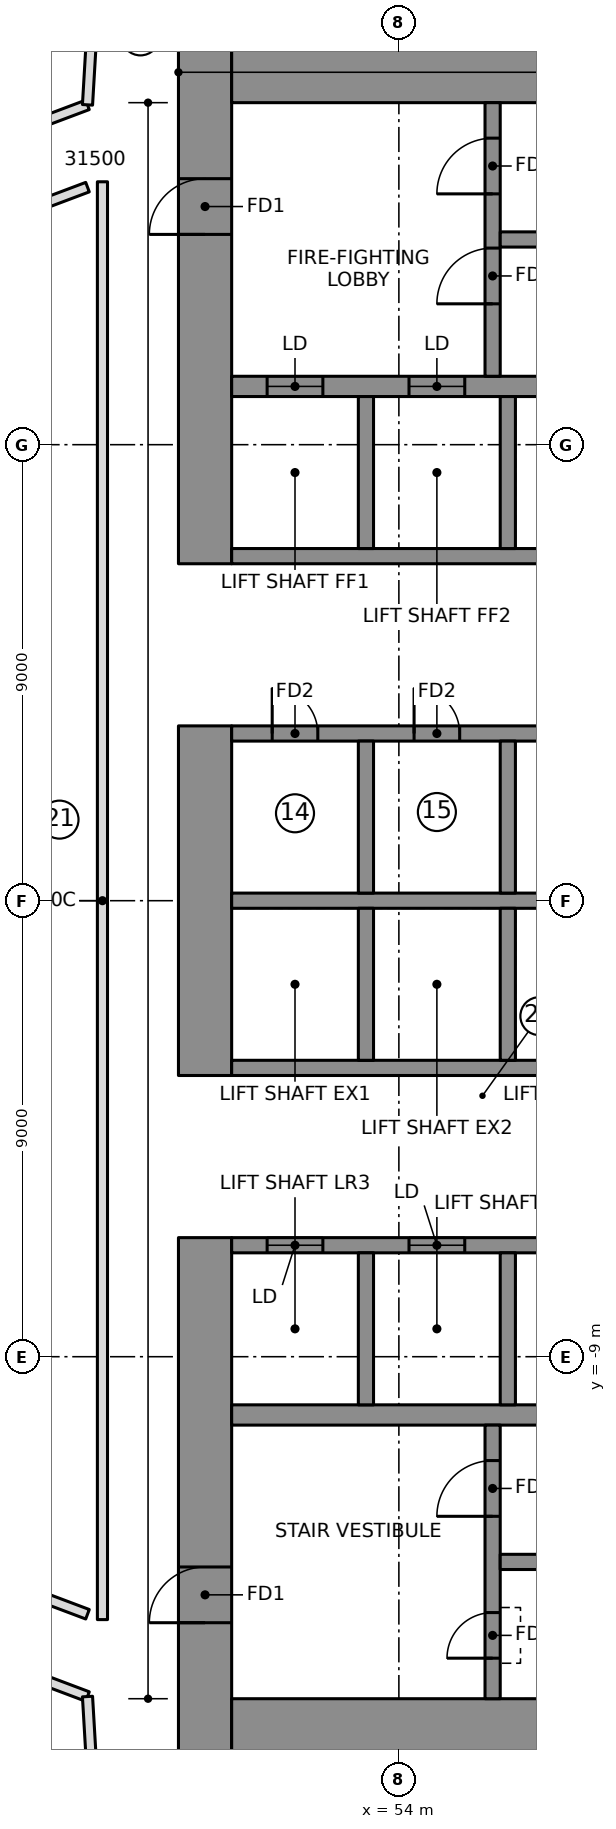
"""IFC4 building model, lengths in metres.
Left out: names, types, materials, properties, quantities, classifications, styles, units other than length and angle.
Written with IfcOpenShell. Run it as: python <this file> out.ifc"""

import sys

from ifc_helpers import new_model, si_unit, direction, frame, frame_2d, origin, place, context, subcontext, project, spatial, rectangle, extrude, element, fill, save


model = new_model("IFC4")
c1 = context("Model", 3, precision=1e-05, world=origin(), true_north=direction((0.0, 1.0)))
c2 = subcontext(c1, "Body", "Model", "MODEL_VIEW")
j1 = project(units=[si_unit("LENGTHUNIT", "METRE"), si_unit("PLANEANGLEUNIT", "RADIAN")], contexts=[c1])
p1 = place(None, origin())
s1 = spatial("IfcSite", under=j1, at=p1, CompositionType="ELEMENT")
p2 = place(p1, origin())
s2 = spatial("IfcBuilding", under=s1, at=p2, CompositionType="ELEMENT")
p3 = place(p2, frame((0.0, 0.0, 99.1)))
s3 = spatial("IfcBuildingStorey", under=s2, at=p3, CompositionType="ELEMENT", Elevation=99.1)
p4 = place(p3, frame((50.175, 6.65, 0.0), z_axis=(0.0, 0.0, 1.0), x_axis=(0.0, 1.0, 0.0)))
e1 = element("IfcWall", 1, at=p4, inside=s3, PredefinedType="SHEAR", context=c2, shape_type="SweptSolid", body=[
    extrude(rectangle(XDim=10.15, YDim=1.05, at=frame_2d((5.075, 0.0))), origin(), (0.0, 0.0, 1.0), 3.55),
])
p5 = place(p4, frame((6.5, 0.0, 0.0)))
e2 = element("IfcOpeningElement", 2, at=p5, cuts=e1, PredefinedType="OPENING", context=c2, shape_type="SweptSolid", body=[
    extrude(rectangle(XDim=1.1, YDim=2.1, at=frame_2d((0.55, 1.05))), frame((0.0, 0.535, 0.0), z_axis=(0.0, -1.0, 0.0), x_axis=(1.0, 0.0, 0.0)), (0.0, 0.0, 1.0), 1.07),
])
p6 = place(p3, frame((50.175, -3.45, 0.0), z_axis=(0.0, 0.0, 1.0), x_axis=(0.0, 1.0, 0.0)))
e3 = element("IfcWall", 3, at=p6, inside=s3, PredefinedType="SHEAR", context=c2, shape_type="SweptSolid", body=[
    extrude(rectangle(XDim=6.9, YDim=1.05, at=frame_2d((3.45, 0.0))), origin(), (0.0, 0.0, 1.0), 3.55),
])
p7 = place(p3, frame((50.175, -16.8, 0.0), z_axis=(0.0, 0.0, 1.0), x_axis=(0.0, 1.0, 0.0)))
e4 = element("IfcWall", 4, at=p7, inside=s3, PredefinedType="SHEAR", context=c2, shape_type="SweptSolid", body=[
    extrude(rectangle(XDim=10.15, YDim=1.05, at=frame_2d((5.075, 0.0))), origin(), (0.0, 0.0, 1.0), 3.55),
])
p8 = place(p7, frame((2.55, 0.0, 0.0)))
e5 = element("IfcOpeningElement", 5, at=p8, cuts=e4, PredefinedType="OPENING", context=c2, shape_type="SweptSolid", body=[
    extrude(rectangle(XDim=1.1, YDim=2.1, at=frame_2d((0.55, 1.05))), frame((0.0, 0.535, 0.0), z_axis=(0.0, -1.0, 0.0), x_axis=(1.0, 0.0, 0.0)), (0.0, 0.0, 1.0), 1.07),
])
for number, where, z_axis, x_axis in (
    (6, (50.7, 16.275, 0.0), (0.0, 0.0, 1.0), (1.0, 0.0, 0.0)),
    (7, (50.7, -16.275, 0.0), (0.0, 0.0, 1.0), (1.0, 0.0, 0.0)),
):
    element("IfcWall", number, at=place(p3, frame(where, z_axis=z_axis, x_axis=x_axis)), inside=s3, PredefinedType="SHEAR", context=c2, shape_type="SweptSolid", body=[
        extrude(rectangle(XDim=14.07, YDim=1.05, at=frame_2d((7.035, 0.0))), origin(), (0.0, 0.0, 1.0), 3.55),
    ])
p9 = place(p3, frame((50.7, 10.15, 0.0), z_axis=(0.0, 0.0, 1.0), x_axis=(1.0, 0.0, 0.0)))
e8 = element("IfcWall", 8, at=p9, inside=s3, PredefinedType="SHEAR", context=c2, shape_type="SweptSolid", body=[
    extrude(rectangle(XDim=13.02, YDim=0.4, at=frame_2d((6.51, 0.0))), origin(), (0.0, 0.0, 1.0), 3.55),
])
p10 = place(p9, frame((0.7, 0.0, 0.0)))
e9 = element("IfcOpeningElement", 9, at=p10, cuts=e8, PredefinedType="OPENING", context=c2, shape_type="SweptSolid", body=[
    extrude(rectangle(XDim=1.1, YDim=2.1, at=frame_2d((0.55, 1.05))), frame((0.0, 0.21, 0.0), z_axis=(0.0, -1.0, 0.0), x_axis=(1.0, 0.0, 0.0)), (0.0, 0.0, 1.0), 0.42),
])
p11 = place(p9, frame((3.5, 0.0, 0.0)))
e10 = element("IfcOpeningElement", 10, at=p11, cuts=e8, PredefinedType="OPENING", context=c2, shape_type="SweptSolid", body=[
    extrude(rectangle(XDim=1.1, YDim=2.1, at=frame_2d((0.55, 1.05))), frame((0.0, 0.21, 0.0), z_axis=(0.0, -1.0, 0.0), x_axis=(1.0, 0.0, 0.0)), (0.0, 0.0, 1.0), 0.42),
])
p12 = place(p3, frame((50.7, -10.15, 0.0), z_axis=(0.0, 0.0, 1.0), x_axis=(1.0, 0.0, 0.0)))
e11 = element("IfcWall", 11, at=p12, inside=s3, PredefinedType="SHEAR", context=c2, shape_type="SweptSolid", body=[
    extrude(rectangle(XDim=13.02, YDim=0.4, at=frame_2d((6.51, 0.0))), origin(), (0.0, 0.0, 1.0), 3.55),
])
p13 = place(p3, frame((50.7, 0.0, 0.0), z_axis=(0.0, 0.0, 1.0), x_axis=(1.0, 0.0, 0.0)))
e12 = element("IfcWall", 12, at=p13, inside=s3, PredefinedType="SHEAR", context=c2, shape_type="SweptSolid", body=[
    extrude(rectangle(XDim=10.9, YDim=0.3, at=frame_2d((5.45, 0.0))), origin(), (0.0, 0.0, 1.0), 3.55),
])
p14 = place(p3, frame((50.7, 3.3, 0.0), z_axis=(0.0, 0.0, 1.0), x_axis=(1.0, 0.0, 0.0)))
e13 = element("IfcWall", 13, at=p14, inside=s3, PredefinedType="SHEAR", context=c2, shape_type="SweptSolid", body=[
    extrude(rectangle(XDim=10.9, YDim=0.3, at=frame_2d((5.45, 0.0))), origin(), (0.0, 0.0, 1.0), 3.55),
])
p15 = place(p14, frame((0.8, 0.0, 0.0)))
e14 = element("IfcOpeningElement", 14, at=p15, cuts=e13, PredefinedType="OPENING", context=c2, shape_type="SweptSolid", body=[
    extrude(rectangle(XDim=0.9, YDim=2.1, at=frame_2d((0.45, 1.05))), frame((0.0, 0.16, 0.0), z_axis=(0.0, -1.0, 0.0), x_axis=(1.0, 0.0, 0.0)), (0.0, 0.0, 1.0), 0.32),
])
p16 = place(p14, frame((3.6, 0.0, 0.0)))
e15 = element("IfcOpeningElement", 15, at=p16, cuts=e13, PredefinedType="OPENING", context=c2, shape_type="SweptSolid", body=[
    extrude(rectangle(XDim=0.9, YDim=2.1, at=frame_2d((0.45, 1.05))), frame((0.0, 0.16, 0.0), z_axis=(0.0, -1.0, 0.0), x_axis=(1.0, 0.0, 0.0)), (0.0, 0.0, 1.0), 0.32),
])
p17 = place(p14, frame((6.4, 0.0, 0.0)))
e16 = element("IfcOpeningElement", 16, at=p17, cuts=e13, PredefinedType="OPENING", context=c2, shape_type="SweptSolid", body=[
    extrude(rectangle(XDim=0.9, YDim=2.1, at=frame_2d((0.45, 1.05))), frame((0.0, 0.16, 0.0), z_axis=(0.0, -1.0, 0.0), x_axis=(1.0, 0.0, 0.0)), (0.0, 0.0, 1.0), 0.32),
])
p18 = place(p14, frame((9.2, 0.0, 0.0)))
e17 = element("IfcOpeningElement", 17, at=p18, cuts=e13, PredefinedType="OPENING", context=c2, shape_type="SweptSolid", body=[
    extrude(rectangle(XDim=0.9, YDim=2.1, at=frame_2d((0.45, 1.05))), frame((0.0, 0.16, 0.0), z_axis=(0.0, -1.0, 0.0), x_axis=(1.0, 0.0, 0.0)), (0.0, 0.0, 1.0), 0.32),
])
p19 = place(p3, frame((50.7, 6.8, 0.0), z_axis=(0.0, 0.0, 1.0), x_axis=(1.0, 0.0, 0.0)))
e18 = element("IfcWall", 18, at=p19, inside=s3, PredefinedType="SHEAR", context=c2, shape_type="SweptSolid", body=[
    extrude(rectangle(XDim=10.9, YDim=0.3, at=frame_2d((5.45, 0.0))), origin(), (0.0, 0.0, 1.0), 3.55),
])
p20 = place(p19, frame((6.3, 0.0, 0.0)))
e19 = element("IfcOpeningElement", 19, at=p20, cuts=e18, PredefinedType="OPENING", context=c2, shape_type="SweptSolid", body=[
    extrude(rectangle(XDim=1.1, YDim=2.1, at=frame_2d((0.55, 1.05))), frame((0.0, 0.16, 0.0), z_axis=(0.0, -1.0, 0.0), x_axis=(1.0, 0.0, 0.0)), (0.0, 0.0, 1.0), 0.32),
])
p21 = place(p19, frame((9.1, 0.0, 0.0)))
e20 = element("IfcOpeningElement", 20, at=p21, cuts=e18, PredefinedType="OPENING", context=c2, shape_type="SweptSolid", body=[
    extrude(rectangle(XDim=1.1, YDim=2.1, at=frame_2d((0.55, 1.05))), frame((0.0, 0.16, 0.0), z_axis=(0.0, -1.0, 0.0), x_axis=(1.0, 0.0, 0.0)), (0.0, 0.0, 1.0), 0.32),
])
for number, where, z_axis, x_axis in (
    (21, (53.35, 0.15, 0.0), (0.0, 0.0, 1.0), (0.0, 1.0, 0.0)),
    (22, (53.35, 6.95, 0.0), (0.0, 0.0, 1.0), (0.0, 1.0, 0.0)),
    (23, (56.15, 0.15, 0.0), (0.0, 0.0, 1.0), (0.0, 1.0, 0.0)),
    (24, (56.15, 6.95, 0.0), (0.0, 0.0, 1.0), (0.0, 1.0, 0.0)),
):
    element("IfcWall", number, at=place(p3, frame(where, z_axis=z_axis, x_axis=x_axis)), inside=s3, PredefinedType="SHEAR", context=c2, shape_type="SweptSolid", body=[
        extrude(rectangle(XDim=3.0, YDim=0.3, at=frame_2d((1.5, 0.0))), origin(), (0.0, 0.0, 1.0), 3.55),
    ])
p22 = place(p3, frame((50.7, -3.3, 0.0), z_axis=(0.0, 0.0, 1.0), x_axis=(1.0, 0.0, 0.0)))
e25 = element("IfcWall", 25, at=p22, inside=s3, PredefinedType="SHEAR", context=c2, shape_type="SweptSolid", body=[
    extrude(rectangle(XDim=10.9, YDim=0.3, at=frame_2d((5.45, 0.0))), origin(), (0.0, 0.0, 1.0), 3.55),
])
p23 = place(p22, frame((9.2, 0.0, 0.0)))
e26 = element("IfcOpeningElement", 26, at=p23, cuts=e25, PredefinedType="OPENING", context=c2, shape_type="SweptSolid", body=[
    extrude(rectangle(XDim=0.9, YDim=2.1, at=frame_2d((0.45, 1.05))), frame((0.0, 0.16, 0.0), z_axis=(0.0, -1.0, 0.0), x_axis=(1.0, 0.0, 0.0)), (0.0, 0.0, 1.0), 0.32),
])
p24 = place(p3, frame((50.7, -6.8, 0.0), z_axis=(0.0, 0.0, 1.0), x_axis=(1.0, 0.0, 0.0)))
e27 = element("IfcWall", 27, at=p24, inside=s3, PredefinedType="SHEAR", context=c2, shape_type="SweptSolid", body=[
    extrude(rectangle(XDim=10.9, YDim=0.3, at=frame_2d((5.45, 0.0))), origin(), (0.0, 0.0, 1.0), 3.55),
])
p25 = place(p24, frame((0.7, 0.0, 0.0)))
e28 = element("IfcOpeningElement", 28, at=p25, cuts=e27, PredefinedType="OPENING", context=c2, shape_type="SweptSolid", body=[
    extrude(rectangle(XDim=1.1, YDim=2.1, at=frame_2d((0.55, 1.05))), frame((0.0, 0.16, 0.0), z_axis=(0.0, -1.0, 0.0), x_axis=(1.0, 0.0, 0.0)), (0.0, 0.0, 1.0), 0.32),
])
p26 = place(p24, frame((3.5, 0.0, 0.0)))
e29 = element("IfcOpeningElement", 29, at=p26, cuts=e27, PredefinedType="OPENING", context=c2, shape_type="SweptSolid", body=[
    extrude(rectangle(XDim=1.1, YDim=2.1, at=frame_2d((0.55, 1.05))), frame((0.0, 0.16, 0.0), z_axis=(0.0, -1.0, 0.0), x_axis=(1.0, 0.0, 0.0)), (0.0, 0.0, 1.0), 0.32),
])
p27 = place(p24, frame((6.3, 0.0, 0.0)))
e30 = element("IfcOpeningElement", 30, at=p27, cuts=e27, PredefinedType="OPENING", context=c2, shape_type="SweptSolid", body=[
    extrude(rectangle(XDim=1.1, YDim=2.1, at=frame_2d((0.55, 1.05))), frame((0.0, 0.16, 0.0), z_axis=(0.0, -1.0, 0.0), x_axis=(1.0, 0.0, 0.0)), (0.0, 0.0, 1.0), 0.32),
])
p28 = place(p24, frame((9.1, 0.0, 0.0)))
e31 = element("IfcOpeningElement", 31, at=p28, cuts=e27, PredefinedType="OPENING", context=c2, shape_type="SweptSolid", body=[
    extrude(rectangle(XDim=1.1, YDim=2.1, at=frame_2d((0.55, 1.05))), frame((0.0, 0.16, 0.0), z_axis=(0.0, -1.0, 0.0), x_axis=(1.0, 0.0, 0.0)), (0.0, 0.0, 1.0), 0.32),
])
for number, where, z_axis, x_axis in (
    (32, (53.35, -3.15, 0.0), (0.0, 0.0, 1.0), (0.0, 1.0, 0.0)),
    (33, (53.35, -9.95, 0.0), (0.0, 0.0, 1.0), (0.0, 1.0, 0.0)),
    (34, (56.15, -3.15, 0.0), (0.0, 0.0, 1.0), (0.0, 1.0, 0.0)),
    (35, (56.15, -9.95, 0.0), (0.0, 0.0, 1.0), (0.0, 1.0, 0.0)),
):
    element("IfcWall", number, at=place(p3, frame(where, z_axis=z_axis, x_axis=x_axis)), inside=s3, PredefinedType="SHEAR", context=c2, shape_type="SweptSolid", body=[
        extrude(rectangle(XDim=3.0, YDim=0.3, at=frame_2d((1.5, 0.0))), origin(), (0.0, 0.0, 1.0), 3.55),
    ])
p29 = place(p3, frame((55.85, 10.35, 0.0), z_axis=(0.0, 0.0, 1.0), x_axis=(0.0, 1.0, 0.0)))
e36 = element("IfcWall", 36, at=p29, inside=s3, PredefinedType="SHEAR", context=c2, shape_type="SweptSolid", body=[
    extrude(rectangle(XDim=5.4, YDim=0.3, at=frame_2d((2.7, 0.0))), origin(), (0.0, 0.0, 1.0), 3.55),
])
p30 = place(p29, frame((1.43, 0.0, 0.0)))
e37 = element("IfcOpeningElement", 37, at=p30, cuts=e36, PredefinedType="OPENING", context=c2, shape_type="SweptSolid", body=[
    extrude(rectangle(XDim=1.1, YDim=2.1, at=frame_2d((0.55, 1.05))), frame((0.0, 0.16, 0.0), z_axis=(0.0, -1.0, 0.0), x_axis=(1.0, 0.0, 0.0)), (0.0, 0.0, 1.0), 0.32),
])
p31 = place(p29, frame((3.6, 0.0, 0.0)))
e38 = element("IfcOpeningElement", 38, at=p31, cuts=e36, PredefinedType="OPENING", context=c2, shape_type="SweptSolid", body=[
    extrude(rectangle(XDim=1.1, YDim=2.1, at=frame_2d((0.55, 1.05))), frame((0.0, 0.16, 0.0), z_axis=(0.0, -1.0, 0.0), x_axis=(1.0, 0.0, 0.0)), (0.0, 0.0, 1.0), 0.32),
])
p32 = place(p3, frame((55.85, -15.75, 0.0), z_axis=(0.0, 0.0, 1.0), x_axis=(0.0, 1.0, 0.0)))
e39 = element("IfcWall", 39, at=p32, inside=s3, PredefinedType="SHEAR", context=c2, shape_type="SweptSolid", body=[
    extrude(rectangle(XDim=5.4, YDim=0.3, at=frame_2d((2.7, 0.0))), origin(), (0.0, 0.0, 1.0), 3.55),
])
p33 = place(p32, frame((3.6, 0.0, 0.0)))
e40 = element("IfcOpeningElement", 40, at=p33, cuts=e39, PredefinedType="OPENING", context=c2, shape_type="SweptSolid", body=[
    extrude(rectangle(XDim=1.1, YDim=2.1, at=frame_2d((0.55, 1.05))), frame((0.0, 0.16, 0.0), z_axis=(0.0, -1.0, 0.0), x_axis=(1.0, 0.0, 0.0)), (0.0, 0.0, 1.0), 0.32),
])
p34 = place(p32, frame((0.8, 0.0, 0.0)))
e41 = element("IfcOpeningElement", 41, at=p34, cuts=e39, PredefinedType="OPENING", context=c2, shape_type="SweptSolid", body=[
    extrude(rectangle(XDim=0.9, YDim=2.1, at=frame_2d((0.45, 1.05))), frame((0.0, 0.16, 0.0), z_axis=(0.0, -1.0, 0.0), x_axis=(1.0, 0.0, 0.0)), (0.0, 0.0, 1.0), 0.32),
])
for number, where, z_axis, x_axis in (
    (42, (56.0, 13.05, 0.0), (0.0, 0.0, 1.0), (1.0, 0.0, 0.0)),
    (43, (56.0, -13.05, 0.0), (0.0, 0.0, 1.0), (1.0, 0.0, 0.0)),
):
    element("IfcWall", number, at=place(p3, frame(where, z_axis=z_axis, x_axis=x_axis)), inside=s3, PredefinedType="SHEAR", context=c2, shape_type="SweptSolid", body=[
        extrude(rectangle(XDim=7.72, YDim=0.3, at=frame_2d((3.86, 0.0))), origin(), (0.0, 0.0, 1.0), 3.55),
    ])
for number, where, z_axis, x_axis in (
    (44, (47.855, 15.707, 0.0), (0.0, 0.0, 1.0), (-0.936, -0.353, 0.0)),
    (45, (46.924, -15.357, 0.0), (0.0, 0.0, 1.0), (0.936, -0.353, 0.0)),
):
    element("IfcWall", number, at=place(p3, frame(where, z_axis=z_axis, x_axis=x_axis)), inside=s3, PredefinedType="PARTITIONING", context=c2, shape_type="SweptSolid", body=[
        extrude(rectangle(XDim=0.995, YDim=0.2, at=frame_2d((0.497, 0.0))), origin(), (0.0, 0.0, 1.0), 3.25),
    ])
for number, where, z_axis, x_axis in (
    (46, (46.696, 13.647, 0.0), (0.0, 0.0, 1.0), (0.936, 0.352, 0.0)),
    (47, (47.855, -14.083, 0.0), (0.0, 0.0, 1.0), (-0.936, 0.352, 0.0)),
):
    element("IfcWall", number, at=place(p3, frame(where, z_axis=z_axis, x_axis=x_axis)), inside=s3, PredefinedType="PARTITIONING", context=c2, shape_type="SweptSolid", body=[
        extrude(rectangle(XDim=1.239, YDim=0.2, at=frame_2d((0.619, 0.0))), origin(), (0.0, 0.0, 1.0), 3.25),
    ])
p35 = place(p3, frame((48.146, 20.652, 0.0), z_axis=(0.0, 0.0, 1.0), x_axis=(-0.058649792989, -0.998278619315, 0.0)))
e48 = element("IfcWall", 48, at=p35, inside=s3, PredefinedType="PARTITIONING", context=c2, shape_type="SweptSolid", body=[
    extrude(rectangle(XDim=4.954, YDim=0.2, at=frame_2d((2.477, 0.0))), origin(), (0.0, 0.0, 1.0), 3.25),
])
p36 = place(p35, frame((1.977, 0.0, 0.0)))
e49 = element("IfcOpeningElement", 49, at=p36, cuts=e48, PredefinedType="OPENING", context=c2, shape_type="SweptSolid", body=[
    extrude(rectangle(XDim=1.0, YDim=2.1, at=frame_2d((0.5, 1.05))), frame((0.0, 0.11, 0.0), z_axis=(0.0, -1.0, 0.0), x_axis=(1.0, 0.0, 0.0)), (0.0, 0.0, 1.0), 0.22),
])
p37 = place(p3, frame((47.855, -15.707, 0.0), z_axis=(0.0, 0.0, 1.0), x_axis=(0.058568850083, -0.998283371493, 0.0)))
e50 = element("IfcWall", 50, at=p37, inside=s3, PredefinedType="PARTITIONING", context=c2, shape_type="SweptSolid", body=[
    extrude(rectangle(XDim=4.952, YDim=0.2, at=frame_2d((2.476, 0.0))), origin(), (0.0, 0.0, 1.0), 3.25),
])
p38 = place(p37, frame((1.976, 0.0, 0.0)))
e51 = element("IfcOpeningElement", 51, at=p38, cuts=e50, PredefinedType="OPENING", context=c2, shape_type="SweptSolid", body=[
    extrude(rectangle(XDim=1.0, YDim=2.1, at=frame_2d((0.5, 1.05))), frame((0.0, 0.11, 0.0), z_axis=(0.0, -1.0, 0.0), x_axis=(1.0, 0.0, 0.0)), (0.0, 0.0, 1.0), 0.22),
])
p39 = place(p3, frame((48.15, 14.189, 0.0), z_axis=(0.0, 0.0, 1.0), x_axis=(0.0, -1.0, 0.0)))
e52 = element("IfcWall", 52, at=p39, inside=s3, PredefinedType="PARTITIONING", context=c2, shape_type="SweptSolid", body=[
    extrude(rectangle(XDim=28.377, YDim=0.2, at=frame_2d((14.189, 0.0))), origin(), (0.0, 0.0, 1.0), 3.25),
])
p40 = place(p10, origin())
e53 = element("IfcDoor", 53, at=p40, inside=s3, OperationType="DOUBLE_DOOR_SLIDING", PredefinedType="DOOR", context=c2, shape_type="SweptSolid", body=[
    extrude(rectangle(XDim=1.1, YDim=2.1, at=frame_2d((0.55, 1.05))), frame((0.0, 0.025, 0.0), z_axis=(0.0, -1.0, 0.0), x_axis=(1.0, 0.0, 0.0)), (0.0, 0.0, 1.0), 0.05),
])
fill(e9, e53)
p41 = place(p11, origin())
e54 = element("IfcDoor", 54, at=p41, inside=s3, OperationType="DOUBLE_DOOR_SLIDING", PredefinedType="DOOR", context=c2, shape_type="SweptSolid", body=[
    extrude(rectangle(XDim=1.1, YDim=2.1, at=frame_2d((0.55, 1.05))), frame((0.0, 0.025, 0.0), z_axis=(0.0, -1.0, 0.0), x_axis=(1.0, 0.0, 0.0)), (0.0, 0.0, 1.0), 0.05),
])
fill(e10, e54)
p42 = place(p25, origin())
e55 = element("IfcDoor", 55, at=p42, inside=s3, OperationType="DOUBLE_DOOR_SLIDING", PredefinedType="DOOR", context=c2, shape_type="SweptSolid", body=[
    extrude(rectangle(XDim=1.1, YDim=2.1, at=frame_2d((0.55, 1.05))), frame((0.0, 0.025, 0.0), z_axis=(0.0, -1.0, 0.0), x_axis=(1.0, 0.0, 0.0)), (0.0, 0.0, 1.0), 0.05),
])
fill(e28, e55)
p43 = place(p26, origin())
e56 = element("IfcDoor", 56, at=p43, inside=s3, OperationType="DOUBLE_DOOR_SLIDING", PredefinedType="DOOR", context=c2, shape_type="SweptSolid", body=[
    extrude(rectangle(XDim=1.1, YDim=2.1, at=frame_2d((0.55, 1.05))), frame((0.0, 0.025, 0.0), z_axis=(0.0, -1.0, 0.0), x_axis=(1.0, 0.0, 0.0)), (0.0, 0.0, 1.0), 0.05),
])
fill(e29, e56)
p44 = place(p30, origin())
e57 = element("IfcDoor", 57, at=p44, inside=s3, OperationType="SINGLE_SWING_RIGHT", PredefinedType="DOOR", context=c2, shape_type="SweptSolid", body=[
    extrude(rectangle(XDim=1.1, YDim=2.1, at=frame_2d((0.55, 1.05))), frame((0.0, 0.025, 0.0), z_axis=(0.0, -1.0, 0.0), x_axis=(1.0, 0.0, 0.0)), (0.0, 0.0, 1.0), 0.05),
])
fill(e37, e57)
p45 = place(p31, origin())
e58 = element("IfcDoor", 58, at=p45, inside=s3, OperationType="SINGLE_SWING_RIGHT", PredefinedType="DOOR", context=c2, shape_type="SweptSolid", body=[
    extrude(rectangle(XDim=1.1, YDim=2.1, at=frame_2d((0.55, 1.05))), frame((0.0, 0.025, 0.0), z_axis=(0.0, -1.0, 0.0), x_axis=(1.0, 0.0, 0.0)), (0.0, 0.0, 1.0), 0.05),
])
fill(e38, e58)
p46 = place(p33, origin())
e59 = element("IfcDoor", 59, at=p46, inside=s3, OperationType="SINGLE_SWING_RIGHT", PredefinedType="DOOR", context=c2, shape_type="SweptSolid", body=[
    extrude(rectangle(XDim=1.1, YDim=2.1, at=frame_2d((0.55, 1.05))), frame((0.0, 0.025, 0.0), z_axis=(0.0, -1.0, 0.0), x_axis=(1.0, 0.0, 0.0)), (0.0, 0.0, 1.0), 0.05),
])
fill(e40, e59)
p47 = place(p5, origin())
e60 = element("IfcDoor", 60, at=p47, inside=s3, OperationType="SINGLE_SWING_RIGHT", PredefinedType="DOOR", context=c2, shape_type="SweptSolid", body=[
    extrude(rectangle(XDim=1.1, YDim=2.1, at=frame_2d((0.55, 1.05))), frame((0.0, 0.025, 0.0), z_axis=(0.0, -1.0, 0.0), x_axis=(1.0, 0.0, 0.0)), (0.0, 0.0, 1.0), 0.05),
])
fill(e2, e60)
p48 = place(p8, origin())
e61 = element("IfcDoor", 61, at=p48, inside=s3, OperationType="SINGLE_SWING_RIGHT", PredefinedType="DOOR", context=c2, shape_type="SweptSolid", body=[
    extrude(rectangle(XDim=1.1, YDim=2.1, at=frame_2d((0.55, 1.05))), frame((0.0, 0.025, 0.0), z_axis=(0.0, -1.0, 0.0), x_axis=(1.0, 0.0, 0.0)), (0.0, 0.0, 1.0), 0.05),
])
fill(e5, e61)
p49 = place(p34, origin())
e62 = element("IfcDoor", 62, at=p49, inside=s3, OperationType="SINGLE_SWING_LEFT", PredefinedType="DOOR", context=c2, shape_type="SweptSolid", body=[
    extrude(rectangle(XDim=0.9, YDim=2.1, at=frame_2d((0.45, 1.05))), frame((0.0, 0.025, 0.0), z_axis=(0.0, -1.0, 0.0), x_axis=(1.0, 0.0, 0.0)), (0.0, 0.0, 1.0), 0.05),
])
fill(e41, e62)
p50 = place(p15, origin())
e63 = element("IfcDoor", 63, at=p50, inside=s3, OperationType="SINGLE_SWING_LEFT", PredefinedType="DOOR", context=c2, shape_type="SweptSolid", body=[
    extrude(rectangle(XDim=0.9, YDim=2.1, at=frame_2d((0.45, 1.05))), frame((0.0, 0.025, 0.0), z_axis=(0.0, -1.0, 0.0), x_axis=(1.0, 0.0, 0.0)), (0.0, 0.0, 1.0), 0.05),
])
fill(e14, e63)
p51 = place(p16, origin())
e64 = element("IfcDoor", 64, at=p51, inside=s3, OperationType="SINGLE_SWING_LEFT", PredefinedType="DOOR", context=c2, shape_type="SweptSolid", body=[
    extrude(rectangle(XDim=0.9, YDim=2.1, at=frame_2d((0.45, 1.05))), frame((0.0, 0.025, 0.0), z_axis=(0.0, -1.0, 0.0), x_axis=(1.0, 0.0, 0.0)), (0.0, 0.0, 1.0), 0.05),
])
fill(e15, e64)
save(model, sys.argv[1])
